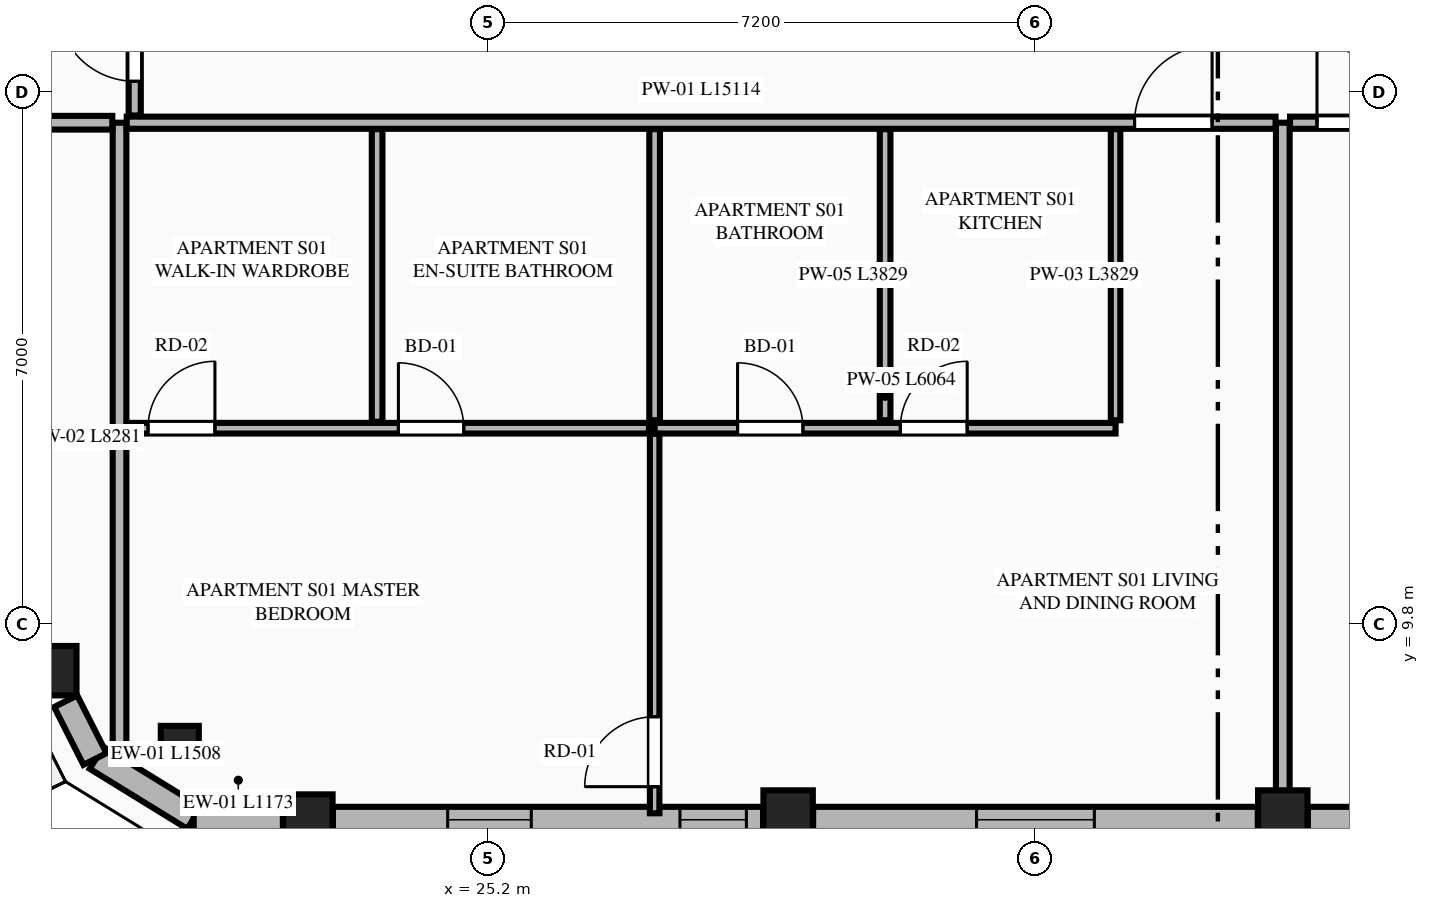
"""IFC4 building model, lengths in metres.
Left out: names, types, materials, properties, quantities, classifications, styles, units other than length and angle.
Written with IfcOpenShell. Run it as: python <this file> out.ifc"""

import sys

from ifc_helpers import new_model, si_unit, direction, frame, frame_2d, origin, origin_2d, place, context, subcontext, project, spatial, rectangle, extrude, element, fill, save


model = new_model("IFC4")
c1 = context("Model", 3, precision=1e-05, world=origin(), true_north=direction((0.0, 1.0)))
c2 = subcontext(c1, "Body", "Model", "MODEL_VIEW")
j1 = project(units=[si_unit("LENGTHUNIT", "METRE"), si_unit("PLANEANGLEUNIT", "RADIAN")], contexts=[c1])
p1 = place(None, origin())
s1 = spatial("IfcSite", under=j1, at=p1, CompositionType="ELEMENT")
p2 = place(p1, origin())
s2 = spatial("IfcBuilding", under=s1, at=p2, CompositionType="ELEMENT")
p3 = place(p2, frame((0.0, 0.0, 259.85)))
s3 = spatial("IfcBuildingStorey", under=s2, at=p3, CompositionType="ELEMENT", Elevation=259.85)
for number, where, z_axis, x_axis in (
    (1, (22.828, 7.239, 0.0), (0.0, 0.0, 1.0), (1.0, 0.0, 0.0)),
    (2, (29.146, 7.292, 0.0), (0.0, 0.0, 1.0), (1.0, 0.0, 0.0)),
    (3, (35.654, 7.292, 0.0), (0.0, 0.0, 1.0), (1.0, 0.0, 0.0)),
    (4, (19.459, 9.191, 0.0), (0.0, 0.0, 1.0), (1.0, 0.0, 0.0)),
):
    element("IfcColumn", number, at=place(p3, frame(where, z_axis=z_axis, x_axis=x_axis)), inside=s3, PredefinedType="COLUMN", context=c2, shape_type="SweptSolid", body=[
        extrude(rectangle(XDim=0.65, YDim=0.65, at=origin_2d()), origin(), (0.0, 0.0, 1.0), 3.65),
    ])
p4 = place(p3, frame((21.143, 8.215, 0.0), z_axis=(0.0, 0.0, 1.0), x_axis=(0.865256437757, -0.501329529272, 0.0)))
e5 = element("IfcColumn", 5, at=p4, inside=s3, PredefinedType="PILASTER", context=c2, shape_type="SweptSolid", body=[
    extrude(rectangle(XDim=0.5, YDim=0.35, at=origin_2d()), origin(), (0.0, 0.0, 1.0), 3.65),
])
p5 = place(p3, frame((20.047, 8.045, 0.0), z_axis=(0.0, 0.0, 1.0), x_axis=(0.851680557619, -0.52406128246, 0.0)))
e6 = element("IfcWall", 6, at=p5, inside=s3, PredefinedType="STANDARD", context=c2, shape_type="SweptSolid", body=[
    extrude(rectangle(XDim=1.508, YDim=0.34, at=frame_2d((0.754, 0.0))), origin(), (0.0, 0.0, 1.0), 3.45),
])
p6 = place(p3, frame((21.326, 7.23, 0.0), z_axis=(0.0, 0.0, 1.0), x_axis=(1.0, 0.0, 0.0)))
e7 = element("IfcWall", 7, at=p6, inside=s3, PredefinedType="STANDARD", context=c2, shape_type="SweptSolid", body=[
    extrude(rectangle(XDim=1.173, YDim=0.34, at=frame_2d((0.586, 0.0))), origin(), (0.0, 0.0, 1.0), 3.45),
])
p7 = place(p3, frame((23.157, 7.23, 0.0), z_axis=(0.0, 0.0, 1.0), x_axis=(1.0, 0.0, 0.0)))
e8 = element("IfcWall", 8, at=p7, inside=s3, PredefinedType="STANDARD", context=c2, shape_type="SweptSolid", body=[
    extrude(rectangle(XDim=5.66, YDim=0.34, at=frame_2d((2.83, 0.0))), origin(), (0.0, 0.0, 1.0), 2.983),
])
p8 = place(p7, frame((1.51, 0.0, 0.75)))
e9 = element("IfcOpeningElement", 9, at=p8, cuts=e8, PredefinedType="OPENING", context=c2, shape_type="SweptSolid", body=[
    extrude(rectangle(XDim=1.1, YDim=2.0, at=frame_2d((0.55, 1.0))), frame((0.0, 0.18, 0.0), z_axis=(0.0, -1.0, 0.0), x_axis=(1.0, 0.0, 0.0)), (0.0, 0.0, 1.0), 0.36),
])
p9 = place(p7, frame((4.566, 0.0, 0.75)))
e10 = element("IfcOpeningElement", 10, at=p9, cuts=e8, PredefinedType="OPENING", context=c2, shape_type="SweptSolid", body=[
    extrude(rectangle(XDim=0.874, YDim=2.0, at=frame_2d((0.437, 1.0))), frame((0.0, 0.18, 0.0), z_axis=(0.0, -1.0, 0.0), x_axis=(1.0, 0.0, 0.0)), (0.0, 0.0, 1.0), 0.36),
])
p10 = place(p3, frame((29.475, 7.23, 0.0), z_axis=(0.0, 0.0, 1.0), x_axis=(1.0, 0.0, 0.0)))
e11 = element("IfcWall", 11, at=p10, inside=s3, PredefinedType="STANDARD", context=c2, shape_type="SweptSolid", body=[
    extrude(rectangle(XDim=5.85, YDim=0.34, at=frame_2d((2.925, 0.0))), origin(), (0.0, 0.0, 1.0), 2.983),
])
p11 = place(p10, frame((2.15, 0.0, 0.75)))
e12 = element("IfcOpeningElement", 12, at=p11, cuts=e11, PredefinedType="OPENING", context=c2, shape_type="SweptSolid", body=[
    extrude(rectangle(XDim=1.55, YDim=2.05, at=frame_2d((0.775, 1.025))), frame((0.0, 0.18, 0.0), z_axis=(0.0, -1.0, 0.0), x_axis=(1.0, 0.0, 0.0)), (0.0, 0.0, 1.0), 0.36),
])
p12 = place(p3, frame((35.983, 7.23, 0.0), z_axis=(0.0, 0.0, 1.0), x_axis=(1.0, 0.0, 0.0)))
e13 = element("IfcWall", 13, at=p12, inside=s3, PredefinedType="STANDARD", context=c2, shape_type="SweptSolid", body=[
    extrude(rectangle(XDim=5.66, YDim=0.34, at=frame_2d((2.83, 0.0))), origin(), (0.0, 0.0, 1.0), 2.983),
])
p13 = place(p12, frame((2.13, 0.0, 0.75)))
e14 = element("IfcOpeningElement", 14, at=p13, cuts=e13, PredefinedType="OPENING", context=c2, shape_type="SweptSolid", body=[
    extrude(rectangle(XDim=1.4, YDim=2.05, at=frame_2d((0.7, 1.025))), frame((0.0, 0.18, 0.0), z_axis=(0.0, -1.0, 0.0), x_axis=(1.0, 0.0, 0.0)), (0.0, 0.0, 1.0), 0.36),
])
p14 = place(p3, frame((19.642, 8.789, 0.0), z_axis=(0.0, 0.0, 1.0), x_axis=(0.451907025977, -0.8920650424, 0.0)))
e15 = element("IfcWall", 15, at=p14, inside=s3, PredefinedType="STANDARD", context=c2, shape_type="SweptSolid", body=[
    extrude(rectangle(XDim=0.852, YDim=0.34, at=frame_2d((0.426, 0.0))), origin(), (0.0, 0.0, 1.0), 3.45),
])
p15 = place(p3, frame((20.35, 8.119, 0.0), z_axis=(0.0, 0.0, 1.0), x_axis=(0.0, 1.0, 0.0)))
e16 = element("IfcWall", 16, at=p15, inside=s3, PredefinedType="PARTITIONING", context=c2, shape_type="SweptSolid", body=[
    extrude(rectangle(XDim=8.281, YDim=0.18, at=frame_2d((4.141, 0.0))), origin(), (0.0, 0.0, 1.0), 3.45),
])
p16 = place(p3, frame((35.654, 7.405, 0.0), z_axis=(0.0, 0.0, 1.0), x_axis=(0.0, 1.0, 0.0)))
e17 = element("IfcWall", 17, at=p16, inside=s3, PredefinedType="PARTITIONING", context=c2, shape_type="SweptSolid", body=[
    extrude(rectangle(XDim=8.995, YDim=0.18, at=frame_2d((4.498, 0.0))), origin(), (0.0, 0.0, 1.0), 2.907),
])
p17 = place(p3, frame((20.445, 16.4, 0.0), z_axis=(0.0, 0.0, 1.0), x_axis=(1.0, 0.0, 0.0)))
e18 = element("IfcWall", 18, at=p17, inside=s3, PredefinedType="PARTITIONING", context=c2, shape_type="SweptSolid", body=[
    extrude(rectangle(XDim=15.114, YDim=0.16, at=frame_2d((7.557, 0.0))), origin(), (0.0, 0.0, 1.0), 3.45),
])
p18 = place(p17, frame((13.259, 0.0, 0.0)))
e19 = element("IfcOpeningElement", 19, at=p18, cuts=e18, PredefinedType="OPENING", context=c2, shape_type="SweptSolid", body=[
    extrude(rectangle(XDim=1.02, YDim=2.25, at=frame_2d((0.51, 1.125))), frame((0.0, 0.09, 0.0), z_axis=(0.0, -1.0, 0.0), x_axis=(1.0, 0.0, 0.0)), (0.0, 0.0, 1.0), 0.18),
])
p19 = place(p3, frame((33.454, 12.486, 0.0), z_axis=(0.0, 0.0, 1.0), x_axis=(0.0, 1.0, 0.0)))
e20 = element("IfcWall", 20, at=p19, inside=s3, PredefinedType="PARTITIONING", context=c2, shape_type="SweptSolid", body=[
    extrude(rectangle(XDim=3.829, YDim=0.125, at=frame_2d((1.915, 0.0))), origin(), (0.0, 0.0, 1.0), 3.45),
])
p20 = place(p3, frame((27.39, 12.381, 0.0), z_axis=(0.0, 0.0, 1.0), x_axis=(1.0, 0.0, 0.0)))
e21 = element("IfcWall", 21, at=p20, inside=s3, PredefinedType="PLUMBINGWALL", context=c2, shape_type="SweptSolid", body=[
    extrude(rectangle(XDim=6.064, YDim=0.14, at=frame_2d((3.032, 0.0))), origin(), (0.0, 0.0, 1.0), 3.45),
])
p21 = place(p20, frame((1.091, 0.0, 0.0)))
e22 = element("IfcOpeningElement", 22, at=p21, cuts=e21, PredefinedType="OPENING", context=c2, shape_type="SweptSolid", body=[
    extrude(rectangle(XDim=0.86, YDim=2.1, at=frame_2d((0.43, 1.05))), frame((0.0, 0.08, 0.0), z_axis=(0.0, -1.0, 0.0), x_axis=(1.0, 0.0, 0.0)), (0.0, 0.0, 1.0), 0.16),
])
p22 = place(p20, frame((3.232, 0.0, 0.0)))
e23 = element("IfcOpeningElement", 23, at=p22, cuts=e21, PredefinedType="OPENING", context=c2, shape_type="SweptSolid", body=[
    extrude(rectangle(XDim=0.88, YDim=2.15, at=frame_2d((0.44, 1.075))), frame((0.0, 0.08, 0.0), z_axis=(0.0, -1.0, 0.0), x_axis=(1.0, 0.0, 0.0)), (0.0, 0.0, 1.0), 0.16),
])
p23 = place(p3, frame((20.445, 12.381, 0.0), z_axis=(0.0, 0.0, 1.0), x_axis=(1.0, 0.0, 0.0)))
e24 = element("IfcWall", 24, at=p23, inside=s3, PredefinedType="PLUMBINGWALL", context=c2, shape_type="SweptSolid", body=[
    extrude(rectangle(XDim=6.87, YDim=0.14, at=frame_2d((3.435, 0.0))), origin(), (0.0, 0.0, 1.0), 3.45),
])
p24 = place(p23, frame((0.28, 0.0, 0.0)))
e25 = element("IfcOpeningElement", 25, at=p24, cuts=e24, PredefinedType="OPENING", context=c2, shape_type="SweptSolid", body=[
    extrude(rectangle(XDim=0.88, YDim=2.15, at=frame_2d((0.44, 1.075))), frame((0.0, 0.08, 0.0), z_axis=(0.0, -1.0, 0.0), x_axis=(1.0, 0.0, 0.0)), (0.0, 0.0, 1.0), 0.16),
])
p25 = place(p23, frame((3.574, 0.0, 0.0)))
e26 = element("IfcOpeningElement", 26, at=p25, cuts=e24, PredefinedType="OPENING", context=c2, shape_type="SweptSolid", body=[
    extrude(rectangle(XDim=0.86, YDim=2.1, at=frame_2d((0.43, 1.05))), frame((0.0, 0.08, 0.0), z_axis=(0.0, -1.0, 0.0), x_axis=(1.0, 0.0, 0.0)), (0.0, 0.0, 1.0), 0.16),
])
for number, where, z_axis, x_axis in (
    (27, (30.422, 12.486, 0.0), (0.0, 0.0, 1.0), (0.0, 1.0, 0.0)),
    (28, (27.39, 12.486, 0.0), (0.0, 0.0, 1.0), (0.0, 1.0, 0.0)),
):
    element("IfcWall", number, at=place(p3, frame(where, z_axis=z_axis, x_axis=x_axis)), inside=s3, PredefinedType="PLUMBINGWALL", context=c2, shape_type="SweptSolid", body=[
        extrude(rectangle(XDim=3.829, YDim=0.14, at=frame_2d((1.915, 0.0))), origin(), (0.0, 0.0, 1.0), 3.45),
    ])
p26 = place(p3, frame((27.39, 7.315, 0.0), z_axis=(0.0, 0.0, 1.0), x_axis=(0.0, 1.0, 0.0)))
e29 = element("IfcWall", 29, at=p26, inside=s3, PredefinedType="PARTITIONING", context=c2, shape_type="SweptSolid", body=[
    extrude(rectangle(XDim=4.991, YDim=0.125, at=frame_2d((2.496, 0.0))), origin(), (0.0, 0.0, 1.0), 3.45),
])
p27 = place(p26, frame((0.35, 0.0, 0.0)))
e30 = element("IfcOpeningElement", 30, at=p27, cuts=e29, PredefinedType="OPENING", context=c2, shape_type="SweptSolid", body=[
    extrude(rectangle(XDim=0.92, YDim=2.15, at=frame_2d((0.46, 1.075))), frame((0.0, 0.073, 0.0), z_axis=(0.0, -1.0, 0.0), x_axis=(1.0, 0.0, 0.0)), (0.0, 0.0, 1.0), 0.145),
])
p28 = place(p3, frame((23.739, 12.466, 0.0), z_axis=(0.0, 0.0, 1.0), x_axis=(0.0, 1.0, 0.0)))
e31 = element("IfcWall", 31, at=p28, inside=s3, PredefinedType="PLUMBINGWALL", context=c2, shape_type="SweptSolid", body=[
    extrude(rectangle(XDim=3.849, YDim=0.14, at=frame_2d((1.924, 0.0))), origin(), (0.0, 0.0, 1.0), 3.45),
])
p29 = place(p3, frame((35.749, 16.4, 0.0), z_axis=(0.0, 0.0, 1.0), x_axis=(1.0, 0.0, 0.0)))
e32 = element("IfcWall", 32, at=p29, inside=s3, PredefinedType="PARTITIONING", context=c2, shape_type="SweptSolid", body=[
    extrude(rectangle(XDim=8.606, YDim=0.16, at=frame_2d((4.303, 0.0))), origin(), (0.0, 0.0, 1.0), 3.45),
])
p30 = place(p29, frame((0.355, 0.0, 0.0)))
e33 = element("IfcOpeningElement", 33, at=p30, cuts=e32, PredefinedType="OPENING", context=c2, shape_type="SweptSolid", body=[
    extrude(rectangle(XDim=1.02, YDim=2.25, at=frame_2d((0.51, 1.125))), frame((0.0, 0.09, 0.0), z_axis=(0.0, -1.0, 0.0), x_axis=(1.0, 0.0, 0.0)), (0.0, 0.0, 1.0), 0.18),
])
p31 = place(p3, frame((16.034, 16.4, 0.0), z_axis=(0.0, 0.0, 1.0), x_axis=(1.0, 0.0, 0.0)))
e34 = element("IfcWall", 34, at=p31, inside=s3, PredefinedType="PARTITIONING", context=c2, shape_type="SweptSolid", body=[
    extrude(rectangle(XDim=4.221, YDim=0.18, at=frame_2d((2.11, 0.0))), origin(), (0.0, 0.0, 1.0), 3.45),
])
p32 = place(p3, frame((20.55, 16.495, 0.0), z_axis=(0.0, 0.0, 1.0), x_axis=(0.0, 1.0, 0.0)))
e35 = element("IfcWall", 35, at=p32, inside=s3, PredefinedType="PARTITIONING", context=c2, shape_type="SweptSolid", body=[
    extrude(rectangle(XDim=8.366, YDim=0.16, at=frame_2d((4.183, 0.0))), origin(), (0.0, 0.0, 1.0), 3.137),
])
p33 = place(p32, frame((0.45, 0.0, 0.0)))
e36 = element("IfcOpeningElement", 36, at=p33, cuts=e35, PredefinedType="OPENING", context=c2, shape_type="SweptSolid", body=[
    extrude(rectangle(XDim=1.02, YDim=2.25, at=frame_2d((0.51, 1.125))), frame((0.0, 0.09, 0.0), z_axis=(0.0, -1.0, 0.0), x_axis=(1.0, 0.0, 0.0)), (0.0, 0.0, 1.0), 0.18),
])
p34 = place(p8, origin())
e37 = element("IfcWindow", 37, at=p34, inside=s3, PartitioningType="SINGLE_PANEL", PredefinedType="WINDOW", context=c2, shape_type="SweptSolid", body=[
    extrude(rectangle(XDim=1.1, YDim=2.0, at=frame_2d((0.55, 1.0))), frame((0.0, 0.03, 0.0), z_axis=(0.0, -1.0, 0.0), x_axis=(1.0, 0.0, 0.0)), (0.0, 0.0, 1.0), 0.06),
])
fill(e9, e37)
p35 = place(p11, origin())
e38 = element("IfcWindow", 38, at=p35, inside=s3, PartitioningType="SINGLE_PANEL", PredefinedType="WINDOW", context=c2, shape_type="SweptSolid", body=[
    extrude(rectangle(XDim=1.55, YDim=2.05, at=frame_2d((0.775, 1.025))), frame((0.0, 0.03, 0.0), z_axis=(0.0, -1.0, 0.0), x_axis=(1.0, 0.0, 0.0)), (0.0, 0.0, 1.0), 0.06),
])
fill(e12, e38)
p36 = place(p21, origin())
e39 = element("IfcDoor", 39, at=p36, inside=s3, OperationType="SINGLE_SWING_LEFT", PredefinedType="DOOR", context=c2, shape_type="SweptSolid", body=[
    extrude(rectangle(XDim=0.86, YDim=2.1, at=frame_2d((0.43, 1.05))), frame((0.0, 0.025, 0.0), z_axis=(0.0, -1.0, 0.0), x_axis=(1.0, 0.0, 0.0)), (0.0, 0.0, 1.0), 0.05),
])
fill(e22, e39)
p37 = place(p24, origin())
e40 = element("IfcDoor", 40, at=p37, inside=s3, OperationType="SINGLE_SWING_RIGHT", PredefinedType="DOOR", context=c2, shape_type="SweptSolid", body=[
    extrude(rectangle(XDim=0.88, YDim=2.15, at=frame_2d((0.44, 1.075))), frame((0.0, 0.025, 0.0), z_axis=(0.0, -1.0, 0.0), x_axis=(1.0, 0.0, 0.0)), (0.0, 0.0, 1.0), 0.05),
])
fill(e25, e40)
p38 = place(p25, origin())
e41 = element("IfcDoor", 41, at=p38, inside=s3, OperationType="SINGLE_SWING_LEFT", PredefinedType="DOOR", context=c2, shape_type="SweptSolid", body=[
    extrude(rectangle(XDim=0.86, YDim=2.1, at=frame_2d((0.43, 1.05))), frame((0.0, 0.025, 0.0), z_axis=(0.0, -1.0, 0.0), x_axis=(1.0, 0.0, 0.0)), (0.0, 0.0, 1.0), 0.05),
])
fill(e26, e41)
p39 = place(p18, origin())
e42 = element("IfcDoor", 42, at=p39, inside=s3, OperationType="SINGLE_SWING_RIGHT", PredefinedType="DOOR", context=c2, shape_type="SweptSolid", body=[
    extrude(rectangle(XDim=1.02, YDim=2.25, at=frame_2d((0.51, 1.125))), frame((0.0, 0.025, 0.0), z_axis=(0.0, -1.0, 0.0), x_axis=(1.0, 0.0, 0.0)), (0.0, 0.0, 1.0), 0.05),
])
fill(e19, e42)
p40 = place(p22, origin())
e43 = element("IfcDoor", 43, at=p40, inside=s3, OperationType="SINGLE_SWING_RIGHT", PredefinedType="DOOR", context=c2, shape_type="SweptSolid", body=[
    extrude(rectangle(XDim=0.88, YDim=2.15, at=frame_2d((0.44, 1.075))), frame((0.0, 0.025, 0.0), z_axis=(0.0, -1.0, 0.0), x_axis=(1.0, 0.0, 0.0)), (0.0, 0.0, 1.0), 0.05),
])
fill(e23, e43)
p41 = place(p27, origin())
e44 = element("IfcDoor", 44, at=p41, inside=s3, OperationType="SINGLE_SWING_LEFT", PredefinedType="DOOR", context=c2, shape_type="SweptSolid", body=[
    extrude(rectangle(XDim=0.92, YDim=2.15, at=frame_2d((0.46, 1.075))), frame((0.0, 0.025, 0.0), z_axis=(0.0, -1.0, 0.0), x_axis=(1.0, 0.0, 0.0)), (0.0, 0.0, 1.0), 0.05),
])
fill(e30, e44)
p42 = place(p30, origin())
e45 = element("IfcDoor", 45, at=p42, inside=s3, OperationType="SINGLE_SWING_LEFT", PredefinedType="DOOR", context=c2, shape_type="SweptSolid", body=[
    extrude(rectangle(XDim=1.02, YDim=2.25, at=frame_2d((0.51, 1.125))), frame((0.0, 0.025, 0.0), z_axis=(0.0, -1.0, 0.0), x_axis=(1.0, 0.0, 0.0)), (0.0, 0.0, 1.0), 0.05),
])
fill(e33, e45)
p43 = place(p33, origin())
e46 = element("IfcDoor", 46, at=p43, inside=s3, OperationType="SINGLE_SWING_RIGHT", PredefinedType="DOOR", context=c2, shape_type="SweptSolid", body=[
    extrude(rectangle(XDim=1.02, YDim=2.25, at=frame_2d((0.51, 1.125))), frame((0.0, 0.025, 0.0), z_axis=(0.0, -1.0, 0.0), x_axis=(1.0, 0.0, 0.0)), (0.0, 0.0, 1.0), 0.05),
])
fill(e36, e46)
p44 = place(p9, origin())
e47 = element("IfcWindow", 47, at=p44, inside=s3, PartitioningType="SINGLE_PANEL", PredefinedType="WINDOW", context=c2, shape_type="SweptSolid", body=[
    extrude(rectangle(XDim=0.874, YDim=2.0, at=frame_2d((0.437, 1.0))), frame((0.0, 0.03, 0.0), z_axis=(0.0, -1.0, 0.0), x_axis=(1.0, 0.0, 0.0)), (0.0, 0.0, 1.0), 0.06),
])
fill(e10, e47)
save(model, sys.argv[1])
